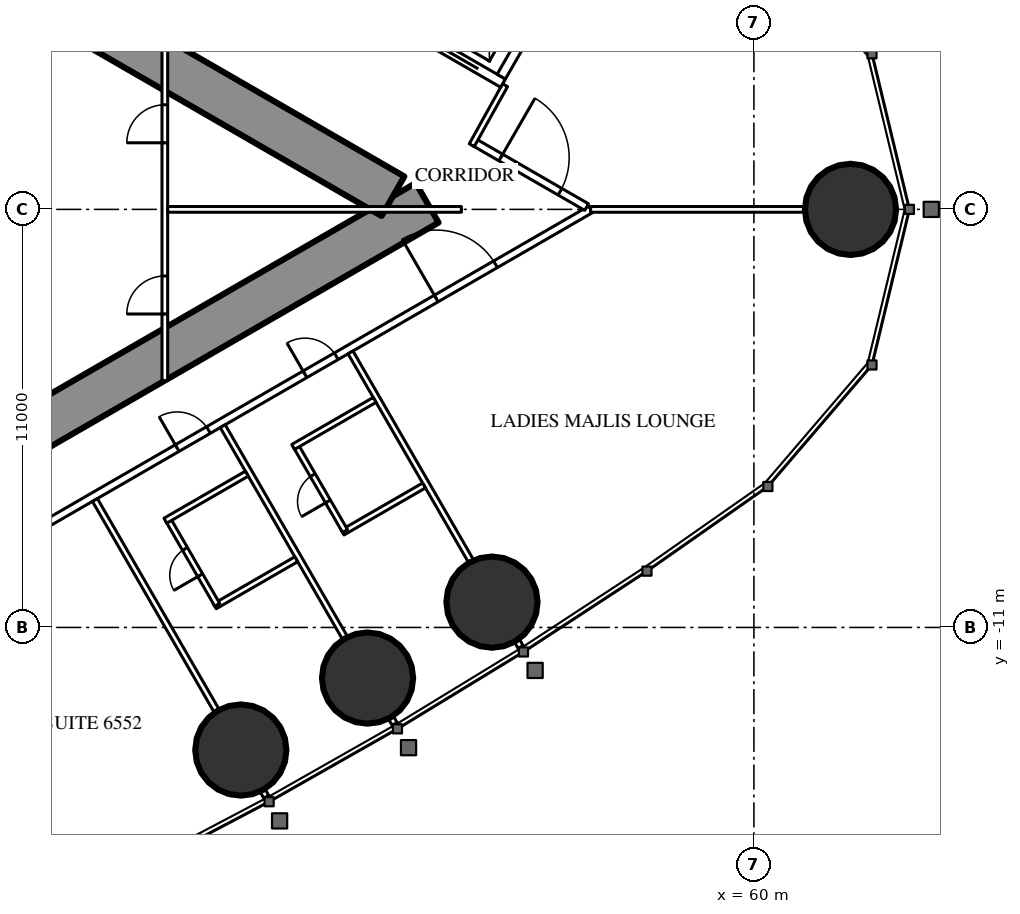
"""IFC4 building model, lengths in metres.
Left out: names, types, materials, properties, quantities, classifications, styles, units other than length and angle.
Written with IfcOpenShell. Run it as: python <this file> out.ifc"""

import sys

from ifc_helpers import new_model, si_unit, direction, frame, frame_2d, origin, origin_2d, place, context, subcontext, project, spatial, rectangle, circle, extrude, element, fill, save


model = new_model("IFC4")
c1 = context("Model", 3, precision=1e-05, world=origin(), true_north=direction((0.0, 1.0)))
c2 = subcontext(c1, "Body", "Model", "MODEL_VIEW")
j1 = project(units=[si_unit("LENGTHUNIT", "METRE"), si_unit("PLANEANGLEUNIT", "RADIAN")], contexts=[c1])
p1 = place(None, origin())
s1 = spatial("IfcSite", under=j1, at=p1, CompositionType="ELEMENT")
p2 = place(p1, origin())
s2 = spatial("IfcBuilding", under=s1, at=p2, CompositionType="ELEMENT")
p3 = place(p2, frame((0.0, 0.0, 244.1)))
s3 = spatial("IfcBuildingStorey", under=s2, at=p3, CompositionType="ELEMENT", Elevation=244.1)
for number, where, z_axis, x_axis in (
    (1, (62.542, 0.0, 0.0), (0.0, 0.0, 1.0), (1.0, 0.0, 0.0)),
    (2, (46.499, -14.226, 0.0), (0.0, 0.0, 1.0), (1.0, 0.0, 0.0)),
    (3, (49.834, -12.332, 0.0), (0.0, 0.0, 1.0), (1.0, 0.0, 0.0)),
    (4, (53.108, -10.334, 0.0), (0.0, 0.0, 1.0), (1.0, 0.0, 0.0)),
):
    element("IfcColumn", number, at=place(p3, frame(where, z_axis=z_axis, x_axis=x_axis)), inside=s3, PredefinedType="COLUMN", context=c2, shape_type="SweptSolid", body=[
        extrude(circle(Radius=1.2, at=origin_2d()), origin(), (0.0, 0.0, 1.0), 3.6),
    ])
p4 = place(p3, frame((27.2, -13.8, 0.0), z_axis=(0.0, 0.0, 1.0), x_axis=(0.866027159892, 0.499996958321, 0.0)))
e5 = element("IfcWall", 5, at=p4, inside=s3, PredefinedType="SHEAR", context=c2, shape_type="SweptSolid", body=[
    extrude(rectangle(XDim=27.947, YDim=1.2, at=frame_2d((13.973, 0.0))), origin(), (0.0, 0.0, 1.0), 3.6),
])
p5 = place(p4, frame((4.6, 0.0, 0.0)))
e6 = element("IfcOpeningElement", 6, at=p5, cuts=e5, PredefinedType="OPENING", context=c2, shape_type="SweptSolid", body=[
    extrude(rectangle(XDim=1.0, YDim=2.2, at=frame_2d((0.5, 1.1))), frame((0.0, 0.61, 0.0), z_axis=(0.0, -1.0, 0.0), x_axis=(1.0, 0.0, 0.0)), (0.0, 0.0, 1.0), 1.22),
])
p6 = place(p4, frame((13.395, 0.0, 0.0)))
e7 = element("IfcOpeningElement", 7, at=p6, cuts=e5, PredefinedType="OPENING", context=c2, shape_type="SweptSolid", body=[
    extrude(rectangle(XDim=1.8, YDim=2.2, at=frame_2d((0.9, 1.1))), frame((0.0, 0.61, 0.0), z_axis=(0.0, -1.0, 0.0), x_axis=(1.0, 0.0, 0.0)), (0.0, 0.0, 1.0), 1.22),
])
p7 = place(p3, frame((27.2, 13.8, 0.0), z_axis=(0.0, 0.0, 1.0), x_axis=(0.866024515034, -0.500001539357, 0.0)))
e8 = element("IfcWall", 8, at=p7, inside=s3, PredefinedType="SHEAR", context=c2, shape_type="SweptSolid", body=[
    extrude(rectangle(XDim=26.907, YDim=1.2, at=frame_2d((13.454, 0.0))), origin(), (0.0, 0.0, 1.0), 3.6),
])
p8 = place(p7, frame((4.6, 0.0, 0.0)))
e9 = element("IfcOpeningElement", 9, at=p8, cuts=e8, PredefinedType="OPENING", context=c2, shape_type="SweptSolid", body=[
    extrude(rectangle(XDim=1.0, YDim=2.2, at=frame_2d((0.5, 1.1))), frame((0.0, 0.61, 0.0), z_axis=(0.0, -1.0, 0.0), x_axis=(1.0, 0.0, 0.0)), (0.0, 0.0, 1.0), 1.22),
])
p9 = place(p7, frame((13.395, 0.0, 0.0)))
e10 = element("IfcOpeningElement", 10, at=p9, cuts=e8, PredefinedType="OPENING", context=c2, shape_type="SweptSolid", body=[
    extrude(rectangle(XDim=1.8, YDim=2.2, at=frame_2d((0.9, 1.1))), frame((0.0, 0.61, 0.0), z_axis=(0.0, -1.0, 0.0), x_axis=(1.0, 0.0, 0.0)), (0.0, 0.0, 1.0), 1.22),
])
p10 = place(p3, frame((28.959, -15.44, 0.0), z_axis=(0.0, 0.0, 1.0), x_axis=(0.866025227435, 0.500000305447, 0.0)))
e11 = element("IfcWall", 11, at=p10, inside=s3, PredefinedType="PARTITIONING", context=c2, shape_type="SweptSolid", body=[
    extrude(rectangle(XDim=30.88, YDim=0.2, at=frame_2d((15.44, 0.0))), origin(), (0.0, 0.0, 1.0), 3.35),
])
p11 = place(p10, frame((1.494, 0.0, 0.0)))
e12 = element("IfcOpeningElement", 12, at=p11, cuts=e11, PredefinedType="OPENING", context=c2, shape_type="SweptSolid", body=[
    extrude(rectangle(XDim=1.8, YDim=2.04, at=frame_2d((0.9, 1.02))), frame((0.0, 0.11, 0.0), z_axis=(0.0, -1.0, 0.0), x_axis=(1.0, 0.0, 0.0)), (0.0, 0.0, 1.0), 0.22),
])
p12 = place(p10, frame((7.687, 0.0, 0.0)))
e13 = element("IfcOpeningElement", 13, at=p12, cuts=e11, PredefinedType="OPENING", context=c2, shape_type="SweptSolid", body=[
    extrude(rectangle(XDim=1.0, YDim=2.2, at=frame_2d((0.5, 1.1))), frame((0.0, 0.11, 0.0), z_axis=(0.0, -1.0, 0.0), x_axis=(1.0, 0.0, 0.0)), (0.0, 0.0, 1.0), 0.22),
])
p13 = place(p10, frame((18.321, 0.0, 0.0)))
e14 = element("IfcOpeningElement", 14, at=p13, cuts=e11, PredefinedType="OPENING", context=c2, shape_type="SweptSolid", body=[
    extrude(rectangle(XDim=0.95, YDim=2.2, at=frame_2d((0.475, 1.1))), frame((0.0, 0.11, 0.0), z_axis=(0.0, -1.0, 0.0), x_axis=(1.0, 0.0, 0.0)), (0.0, 0.0, 1.0), 0.22),
])
p14 = place(p10, frame((22.203, 0.0, 0.0)))
e15 = element("IfcOpeningElement", 15, at=p14, cuts=e11, PredefinedType="OPENING", context=c2, shape_type="SweptSolid", body=[
    extrude(rectangle(XDim=0.95, YDim=2.2, at=frame_2d((0.475, 1.1))), frame((0.0, 0.11, 0.0), z_axis=(0.0, -1.0, 0.0), x_axis=(1.0, 0.0, 0.0)), (0.0, 0.0, 1.0), 0.22),
])
p15 = place(p10, frame((26.192, 0.0, 0.0)))
e16 = element("IfcOpeningElement", 16, at=p15, cuts=e11, PredefinedType="OPENING", context=c2, shape_type="SweptSolid", body=[
    extrude(rectangle(XDim=1.8, YDim=2.2, at=frame_2d((0.9, 1.1))), frame((0.0, 0.11, 0.0), z_axis=(0.0, -1.0, 0.0), x_axis=(1.0, 0.0, 0.0)), (0.0, 0.0, 1.0), 0.22),
])
p16 = place(p3, frame((42.66, -7.646, 0.0), z_axis=(0.0, 0.0, 1.0), x_axis=(0.499996592859, -0.866027370889, 0.0)))
e17 = element("IfcWall", 17, at=p16, inside=s3, PredefinedType="PARTITIONING", context=c2, shape_type="SweptSolid", body=[
    extrude(rectangle(XDim=6.398, YDim=0.15, at=frame_2d((3.199, 0.0))), origin(), (0.0, 0.0, 1.0), 2.45),
])
p17 = place(p3, frame((47.079, -15.3, 0.0), z_axis=(0.0, 0.0, 1.0), x_axis=(0.499212083968, -0.866479829667, 0.0)))
e18 = element("IfcWall", 18, at=p17, inside=s3, PredefinedType="PARTITIONING", context=c2, shape_type="SweptSolid", body=[
    extrude(rectangle(XDim=0.179, YDim=0.15, at=frame_2d((0.09, 0.0))), origin(), (0.0, 0.0, 1.0), 2.45),
])
p18 = place(p3, frame((46.023, -5.704, 0.0), z_axis=(0.0, 0.0, 1.0), x_axis=(0.499984478165, -0.866034365135, 0.0)))
e19 = element("IfcWall", 19, at=p18, inside=s3, PredefinedType="PARTITIONING", context=c2, shape_type="SweptSolid", body=[
    extrude(rectangle(XDim=6.426, YDim=0.15, at=frame_2d((3.213, 0.0))), origin(), (0.0, 0.0, 1.0), 2.45),
])
p19 = place(p3, frame((50.456, -13.382, 0.0), z_axis=(0.0, 0.0, 1.0), x_axis=(0.500661834965, -0.865642955848, 0.0)))
e20 = element("IfcWall", 20, at=p19, inside=s3, PredefinedType="PARTITIONING", context=c2, shape_type="SweptSolid", body=[
    extrude(rectangle(XDim=0.18, YDim=0.15, at=frame_2d((0.09, 0.0))), origin(), (0.0, 0.0, 1.0), 2.45),
])
p20 = place(p3, frame((49.385, -3.763, 0.0), z_axis=(0.0, 0.0, 1.0), x_axis=(0.499999447814, -0.866025722589, 0.0)))
e21 = element("IfcWall", 21, at=p20, inside=s3, PredefinedType="PARTITIONING", context=c2, shape_type="SweptSolid", body=[
    extrude(rectangle(XDim=6.333, YDim=0.15, at=frame_2d((3.166, 0.0))), origin(), (0.0, 0.0, 1.0), 2.45),
])
p21 = place(p3, frame((53.771, -11.36, 0.0), z_axis=(0.0, 0.0, 1.0), x_axis=(0.499524978789, -0.866299483762, 0.0)))
e22 = element("IfcWall", 22, at=p21, inside=s3, PredefinedType="PARTITIONING", context=c2, shape_type="SweptSolid", body=[
    extrude(rectangle(XDim=0.178, YDim=0.15, at=frame_2d((0.089, 0.0))), origin(), (0.0, 0.0, 1.0), 2.45),
])
p22 = place(p3, frame((55.702, 0.0, 0.0), z_axis=(0.0, 0.0, 1.0), x_axis=(1.0, 0.0, 0.0)))
e23 = element("IfcWall", 23, at=p22, inside=s3, PredefinedType="PARTITIONING", context=c2, shape_type="SweptSolid", body=[
    extrude(rectangle(XDim=5.619, YDim=0.15, at=frame_2d((2.81, 0.0))), origin(), (0.0, 0.0, 1.0), 2.45),
])
p23 = place(p3, frame((52.639, 1.769, 0.0), z_axis=(0.0, 0.0, 1.0), x_axis=(0.866027340901, -0.4999966448, 0.0)))
e24 = element("IfcWall", 24, at=p23, inside=s3, PredefinedType="PARTITIONING", context=c2, shape_type="SweptSolid", body=[
    extrude(rectangle(XDim=3.417, YDim=0.2, at=frame_2d((1.708, 0.0))), origin(), (0.0, 0.0, 1.0), 3.35),
])
p24 = place(p23, frame((0.809, 0.0, 0.0)))
e25 = element("IfcOpeningElement", 25, at=p24, cuts=e24, PredefinedType="OPENING", context=c2, shape_type="SweptSolid", body=[
    extrude(rectangle(XDim=1.8, YDim=2.2, at=frame_2d((0.9, 1.1))), frame((0.0, 0.11, 0.0), z_axis=(0.0, -1.0, 0.0), x_axis=(1.0, 0.0, 0.0)), (0.0, 0.0, 1.0), 0.22),
])
p25 = place(p3, frame((52.576, 1.689, 0.0), z_axis=(0.0, 0.0, 1.0), x_axis=(0.485482130951, 0.874246590229, 0.0)))
e26 = element("IfcWall", 26, at=p25, inside=s3, PredefinedType="PARTITIONING", context=c2, shape_type="SweptSolid", body=[
    extrude(rectangle(XDim=1.805, YDim=0.15, at=frame_2d((0.902, 0.0))), origin(), (0.0, 0.0, 1.0), 3.35),
])
p26 = place(p3, frame((45.814, -10.443, 0.0), z_axis=(0.0, 0.0, 1.0), x_axis=(0.866073894602, 0.499916002032, 0.0)))
e27 = element("IfcWall", 27, at=p26, inside=s3, PredefinedType="PARTITIONING", context=c2, shape_type="SweptSolid", body=[
    extrude(rectangle(XDim=2.475, YDim=0.15, at=frame_2d((1.238, 0.0))), origin(), (0.0, 0.0, 1.0), 3.35),
])
p27 = place(p3, frame((44.579, -8.154, 0.0), z_axis=(0.0, 0.0, 1.0), x_axis=(0.500006934395, -0.866021400173, 0.0)))
e28 = element("IfcWall", 28, at=p27, inside=s3, PredefinedType="PARTITIONING", context=c2, shape_type="SweptSolid", body=[
    extrude(rectangle(XDim=2.6, YDim=0.15, at=frame_2d((1.3, 0.0))), origin(), (0.0, 0.0, 1.0), 3.35),
])
p28 = place(p27, frame((0.9, 0.0, 0.0)))
e29 = element("IfcOpeningElement", 29, at=p28, cuts=e28, PredefinedType="OPENING", context=c2, shape_type="SweptSolid", body=[
    extrude(rectangle(XDim=0.8, YDim=2.2, at=frame_2d((0.4, 1.1))), frame((0.0, 0.085, 0.0), z_axis=(0.0, -1.0, 0.0), x_axis=(1.0, 0.0, 0.0)), (0.0, 0.0, 1.0), 0.17),
])
for number, where, z_axis, x_axis in (
    (30, (44.514, -8.191, 0.0), (0.0, 0.0, 1.0), (0.866, 0.5, 0.0)),
    (31, (49.177, -8.502, 0.0), (0.0, 0.0, 1.0), (0.866, 0.5, 0.0)),
):
    element("IfcWall", number, at=place(p3, frame(where, z_axis=z_axis, x_axis=x_axis)), inside=s3, PredefinedType="PARTITIONING", context=c2, shape_type="SweptSolid", body=[
        extrude(rectangle(XDim=2.475, YDim=0.15, at=frame_2d((1.238, 0.0))), origin(), (0.0, 0.0, 1.0), 3.35),
    ])
p29 = place(p3, frame((47.942, -6.213, 0.0), z_axis=(0.0, 0.0, 1.0), x_axis=(0.500047596559, -0.865997922154, 0.0)))
e32 = element("IfcWall", 32, at=p29, inside=s3, PredefinedType="PARTITIONING", context=c2, shape_type="SweptSolid", body=[
    extrude(rectangle(XDim=2.6, YDim=0.15, at=frame_2d((1.3, 0.0))), origin(), (0.0, 0.0, 1.0), 3.35),
])
p30 = place(p29, frame((0.9, 0.0, 0.0)))
e33 = element("IfcOpeningElement", 33, at=p30, cuts=e32, PredefinedType="OPENING", context=c2, shape_type="SweptSolid", body=[
    extrude(rectangle(XDim=0.8, YDim=2.2, at=frame_2d((0.4, 1.1))), frame((0.0, 0.085, 0.0), z_axis=(0.0, -1.0, 0.0), x_axis=(1.0, 0.0, 0.0)), (0.0, 0.0, 1.0), 0.17),
])
p31 = place(p3, frame((47.877, -6.25, 0.0), z_axis=(0.0, 0.0, 1.0), x_axis=(0.866031185235, 0.4999899861, 0.0)))
e34 = element("IfcWall", 34, at=p31, inside=s3, PredefinedType="PARTITIONING", context=c2, shape_type="SweptSolid", body=[
    extrude(rectangle(XDim=2.475, YDim=0.15, at=frame_2d((1.238, 0.0))), origin(), (0.0, 0.0, 1.0), 3.35),
])
p32 = place(p3, frame((44.5, -4.505, 0.0), z_axis=(0.0, 0.0, 1.0), x_axis=(0.0, 1.0, 0.0)))
e35 = element("IfcWall", 35, at=p32, inside=s3, PredefinedType="PARTITIONING", context=c2, shape_type="SweptSolid", body=[
    extrude(rectangle(XDim=9.009, YDim=0.15, at=frame_2d((4.505, 0.0))), origin(), (0.0, 0.0, 1.0), 3.35),
])
p33 = place(p32, frame((1.752, 0.0, 0.0)))
e36 = element("IfcOpeningElement", 36, at=p33, cuts=e35, PredefinedType="OPENING", context=c2, shape_type="SweptSolid", body=[
    extrude(rectangle(XDim=1.0, YDim=2.2, at=frame_2d((0.5, 1.1))), frame((0.0, 0.085, 0.0), z_axis=(0.0, -1.0, 0.0), x_axis=(1.0, 0.0, 0.0)), (0.0, 0.0, 1.0), 0.17),
])
p34 = place(p32, frame((6.257, 0.0, 0.0)))
e37 = element("IfcOpeningElement", 37, at=p34, cuts=e35, PredefinedType="OPENING", context=c2, shape_type="SweptSolid", body=[
    extrude(rectangle(XDim=1.0, YDim=2.2, at=frame_2d((0.5, 1.1))), frame((0.0, 0.085, 0.0), z_axis=(0.0, -1.0, 0.0), x_axis=(1.0, 0.0, 0.0)), (0.0, 0.0, 1.0), 0.17),
])
p35 = place(p3, frame((44.575, 0.0, 0.0), z_axis=(0.0, 0.0, 1.0), x_axis=(1.0, 0.0, 0.0)))
e38 = element("IfcWall", 38, at=p35, inside=s3, PredefinedType="PARTITIONING", context=c2, shape_type="SweptSolid", body=[
    extrude(rectangle(XDim=7.727, YDim=0.15, at=frame_2d((3.864, 0.0))), origin(), (0.0, 0.0, 1.0), 2.45),
])
p36 = place(p3, frame((47.681, 6.622, 0.0), z_axis=(0.0, 0.0, 1.0), x_axis=(0.86603344179, -0.499986077507, 0.0)))
e39 = element("IfcWall", 39, at=p36, inside=s3, PredefinedType="PARTITIONING", context=c2, shape_type="SweptSolid", body=[
    extrude(rectangle(XDim=6.6, YDim=0.25, at=frame_2d((3.3, 0.0))), origin(), (0.0, 0.0, 1.0), 3.35),
])
p37 = place(p36, frame((0.75, 0.0, 0.0)))
e40 = element("IfcOpeningElement", 40, at=p37, cuts=e39, PredefinedType="OPENING", context=c2, shape_type="SweptSolid", body=[
    extrude(rectangle(XDim=1.1, YDim=2.2, at=frame_2d((0.55, 1.1))), frame((0.0, 0.135, 0.0), z_axis=(0.0, -1.0, 0.0), x_axis=(1.0, 0.0, 0.0)), (0.0, 0.0, 1.0), 0.27),
])
p38 = place(p36, frame((2.75, 0.0, 0.0)))
e41 = element("IfcOpeningElement", 41, at=p38, cuts=e39, PredefinedType="OPENING", context=c2, shape_type="SweptSolid", body=[
    extrude(rectangle(XDim=1.1, YDim=2.2, at=frame_2d((0.55, 1.1))), frame((0.0, 0.135, 0.0), z_axis=(0.0, -1.0, 0.0), x_axis=(1.0, 0.0, 0.0)), (0.0, 0.0, 1.0), 0.27),
])
p39 = place(p36, frame((4.75, 0.0, 0.0)))
e42 = element("IfcOpeningElement", 42, at=p39, cuts=e39, PredefinedType="OPENING", context=c2, shape_type="SweptSolid", body=[
    extrude(rectangle(XDim=1.1, YDim=2.2, at=frame_2d((0.55, 1.1))), frame((0.0, 0.135, 0.0), z_axis=(0.0, -1.0, 0.0), x_axis=(1.0, 0.0, 0.0)), (0.0, 0.0, 1.0), 0.27),
])
p40 = place(p3, frame((53.352, 3.493, 0.0), z_axis=(0.0, 0.0, 1.0), x_axis=(0.499872130319, 0.866099216793, 0.0)))
e43 = element("IfcWall", 43, at=p40, inside=s3, PredefinedType="PARTITIONING", context=c2, shape_type="SweptSolid", body=[
    extrude(rectangle(XDim=3.2, YDim=0.25, at=frame_2d((1.6, 0.0))), origin(), (0.0, 0.0, 1.0), 3.35),
])
p41 = place(p28, origin())
e44 = element("IfcDoor", 44, at=p41, inside=s3, OperationType="SINGLE_SWING_RIGHT", PredefinedType="DOOR", context=c2, shape_type="SweptSolid", body=[
    extrude(rectangle(XDim=0.8, YDim=2.2, at=frame_2d((0.4, 1.1))), frame((0.0, 0.025, 0.0), z_axis=(0.0, -1.0, 0.0), x_axis=(1.0, 0.0, 0.0)), (0.0, 0.0, 1.0), 0.05),
])
fill(e29, e44)
p42 = place(p13, origin())
e45 = element("IfcDoor", 45, at=p42, inside=s3, OperationType="SINGLE_SWING_LEFT", PredefinedType="DOOR", context=c2, shape_type="SweptSolid", body=[
    extrude(rectangle(XDim=0.95, YDim=2.2, at=frame_2d((0.475, 1.1))), frame((0.0, 0.025, 0.0), z_axis=(0.0, -1.0, 0.0), x_axis=(1.0, 0.0, 0.0)), (0.0, 0.0, 1.0), 0.05),
])
fill(e14, e45)
p43 = place(p30, origin())
e46 = element("IfcDoor", 46, at=p43, inside=s3, OperationType="SINGLE_SWING_RIGHT", PredefinedType="DOOR", context=c2, shape_type="SweptSolid", body=[
    extrude(rectangle(XDim=0.8, YDim=2.2, at=frame_2d((0.4, 1.1))), frame((0.0, 0.025, 0.0), z_axis=(0.0, -1.0, 0.0), x_axis=(1.0, 0.0, 0.0)), (0.0, 0.0, 1.0), 0.05),
])
fill(e33, e46)
p44 = place(p14, origin())
e47 = element("IfcDoor", 47, at=p44, inside=s3, OperationType="SINGLE_SWING_LEFT", PredefinedType="DOOR", context=c2, shape_type="SweptSolid", body=[
    extrude(rectangle(XDim=0.95, YDim=2.2, at=frame_2d((0.475, 1.1))), frame((0.0, 0.025, 0.0), z_axis=(0.0, -1.0, 0.0), x_axis=(1.0, 0.0, 0.0)), (0.0, 0.0, 1.0), 0.05),
])
fill(e15, e47)
p45 = place(p15, origin())
e48 = element("IfcDoor", 48, at=p45, inside=s3, OperationType="DOUBLE_DOOR_SINGLE_SWING", PredefinedType="DOOR", context=c2, shape_type="SweptSolid", body=[
    extrude(rectangle(XDim=1.8, YDim=2.2, at=frame_2d((0.9, 1.1))), frame((0.0, 0.025, 0.0), z_axis=(0.0, -1.0, 0.0), x_axis=(1.0, 0.0, 0.0)), (0.0, 0.0, 1.0), 0.05),
])
fill(e16, e48)
p46 = place(p24, origin())
e49 = element("IfcDoor", 49, at=p46, inside=s3, OperationType="DOUBLE_DOOR_SINGLE_SWING", PredefinedType="DOOR", context=c2, shape_type="SweptSolid", body=[
    extrude(rectangle(XDim=1.8, YDim=2.2, at=frame_2d((0.9, 1.1))), frame((0.0, 0.025, 0.0), z_axis=(0.0, -1.0, 0.0), x_axis=(1.0, 0.0, 0.0)), (0.0, 0.0, 1.0), 0.05),
])
fill(e25, e49)
p47 = place(p33, origin())
e50 = element("IfcDoor", 50, at=p47, inside=s3, OperationType="SINGLE_SWING_LEFT", PredefinedType="DOOR", context=c2, shape_type="SweptSolid", body=[
    extrude(rectangle(XDim=1.0, YDim=2.2, at=frame_2d((0.5, 1.1))), frame((0.0, 0.025, 0.0), z_axis=(0.0, -1.0, 0.0), x_axis=(1.0, 0.0, 0.0)), (0.0, 0.0, 1.0), 0.05),
])
fill(e36, e50)
p48 = place(p34, origin())
e51 = element("IfcDoor", 51, at=p48, inside=s3, OperationType="SINGLE_SWING_LEFT", PredefinedType="DOOR", context=c2, shape_type="SweptSolid", body=[
    extrude(rectangle(XDim=1.0, YDim=2.2, at=frame_2d((0.5, 1.1))), frame((0.0, 0.025, 0.0), z_axis=(0.0, -1.0, 0.0), x_axis=(1.0, 0.0, 0.0)), (0.0, 0.0, 1.0), 0.05),
])
fill(e37, e51)
p49 = place(p39, origin())
e52 = element("IfcDoor", 52, at=p49, inside=s3, OperationType="DOUBLE_DOOR_SLIDING", PredefinedType="USERDEFINED", context=c2, shape_type="SweptSolid", body=[
    extrude(rectangle(XDim=1.1, YDim=2.2, at=frame_2d((0.55, 1.1))), frame((0.0, 0.025, 0.0), z_axis=(0.0, -1.0, 0.0), x_axis=(1.0, 0.0, 0.0)), (0.0, 0.0, 1.0), 0.05),
])
fill(e42, e52)
save(model, sys.argv[1])
